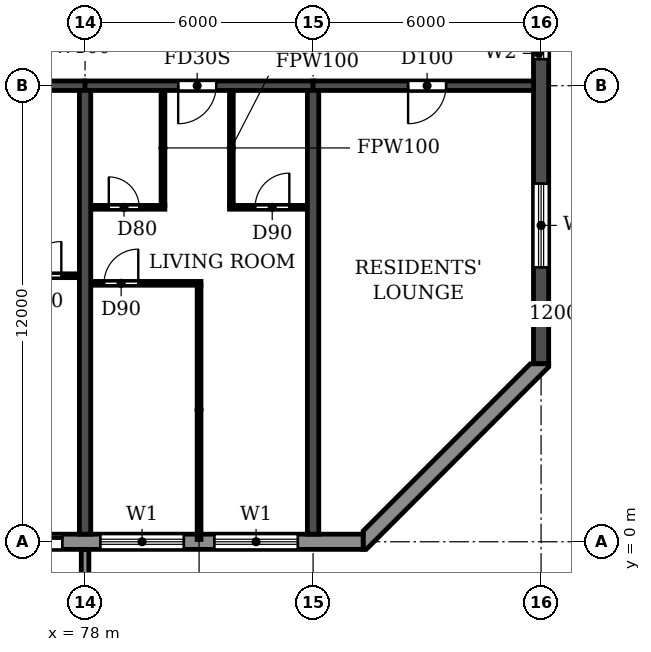
"""IFC4 building model, lengths in metres.
Left out: names, types, materials, properties, quantities, classifications, styles, units other than length and angle.
Written with IfcOpenShell. Run it as: python <this file> out.ifc"""

import sys

from ifc_helpers import new_model, si_unit, direction, frame, frame_2d, origin, place, context, subcontext, project, spatial, polyline, rectangle, outline, extrude, source, transform, mapped, element, fill, save


model = new_model("IFC4")
c1 = context("Model", 3, precision=1e-05, world=origin(), true_north=direction((0.0, 1.0)))
c2 = subcontext(c1, "Body", "Model", "MODEL_VIEW")
j1 = project(units=[si_unit("LENGTHUNIT", "METRE"), si_unit("PLANEANGLEUNIT", "RADIAN")], contexts=[c1])
p1 = place(None, origin())
s1 = spatial("IfcSite", under=j1, at=p1, CompositionType="ELEMENT")
p2 = place(p1, origin())
s2 = spatial("IfcBuilding", under=s1, at=p2, CompositionType="ELEMENT")
p3 = place(p2, frame((0.0, 0.0, 132.3)))
s3 = spatial("IfcBuildingStorey", under=s2, at=p3, CompositionType="ELEMENT", Elevation=132.3)
for number, where, z_axis, x_axis in (
    (1, (78.0, 0.2, 0.0), (0.0, 0.0, 1.0), (0.0, 1.0, 0.0)),
    (2, (84.0, 0.2, 0.0), (0.0, 0.0, 1.0), (0.0, 1.0, 0.0)),
):
    element("IfcWall", number, at=place(p3, frame(where, z_axis=z_axis, x_axis=x_axis)), inside=s3, PredefinedType="SHEAR", context=c2, shape_type="SweptSolid", body=[
        extrude(rectangle(XDim=11.675, YDim=0.3, at=frame_2d((5.837, 0.0))), origin(), (0.0, 0.0, 1.0), 3.07),
    ])
p4 = place(p3, frame((90.0, 4.683, 0.0), z_axis=(0.0, 0.0, 1.0), x_axis=(0.0, 1.0, 0.0)))
e3 = element("IfcWall", 3, at=p4, inside=s3, PredefinedType="SHEAR", context=c2, shape_type="SweptSolid", body=[
    extrude(rectangle(XDim=33.034, YDim=0.4, at=frame_2d((16.517, 0.0))), origin(), (0.0, 0.0, 1.0), 3.07),
])
p5 = place(p4, frame((23.817, 0.0, 0.9)))
e4 = element("IfcOpeningElement", 4, at=p5, cuts=e3, PredefinedType="OPENING", context=c2, shape_type="SweptSolid", body=[
    extrude(rectangle(XDim=1.2, YDim=1.5, at=frame_2d((0.6, 0.75))), frame((0.0, 0.21, 0.0), z_axis=(0.0, -1.0, 0.0), x_axis=(1.0, 0.0, 0.0)), (0.0, 0.0, 1.0), 0.42),
])
p6 = place(p4, frame((8.017, 0.0, 0.9)))
e5 = element("IfcOpeningElement", 5, at=p6, cuts=e3, PredefinedType="OPENING", context=c2, shape_type="SweptSolid", body=[
    extrude(rectangle(XDim=1.2, YDim=1.5, at=frame_2d((0.6, 0.75))), frame((0.0, 0.21, 0.0), z_axis=(0.0, -1.0, 0.0), x_axis=(1.0, 0.0, 0.0)), (0.0, 0.0, 1.0), 0.42),
])
p7 = place(p4, frame((28.293, 0.0, 0.6)))
e6 = element("IfcOpeningElement", 6, at=p7, cuts=e3, PredefinedType="OPENING", context=c2, shape_type="SweptSolid", body=[
    extrude(rectangle(XDim=2.2, YDim=1.8, at=frame_2d((1.1, 0.9))), frame((0.0, 0.21, 0.0), z_axis=(0.0, -1.0, 0.0), x_axis=(1.0, 0.0, 0.0)), (0.0, 0.0, 1.0), 0.42),
])
p8 = place(p4, frame((2.541, 0.0, 0.6)))
e7 = element("IfcOpeningElement", 7, at=p8, cuts=e3, PredefinedType="OPENING", context=c2, shape_type="SweptSolid", body=[
    extrude(rectangle(XDim=2.2, YDim=1.8, at=frame_2d((1.1, 0.9))), frame((0.0, 0.21, 0.0), z_axis=(0.0, -1.0, 0.0), x_axis=(1.0, 0.0, 0.0)), (0.0, 0.0, 1.0), 0.42),
])
p9 = place(p3, frame((72.0, 12.0, 0.0), z_axis=(0.0, 0.0, 1.0), x_axis=(1.0, 0.0, 0.0)))
e8 = element("IfcWall", 8, at=p9, inside=s3, PredefinedType="SHEAR", context=c2, shape_type="SweptSolid", body=[
    extrude(rectangle(XDim=6.0, YDim=0.25, at=frame_2d((3.0, 0.0))), origin(), (0.0, 0.0, 1.0), 2.47),
])
p10 = place(p9, frame((2.45, 0.0, 0.0)))
e9 = element("IfcOpeningElement", 9, at=p10, cuts=e8, PredefinedType="OPENING", context=c2, shape_type="SweptSolid", body=[
    extrude(rectangle(XDim=1.0, YDim=2.1, at=frame_2d((0.5, 1.05))), frame((0.0, 0.135, 0.0), z_axis=(0.0, -1.0, 0.0), x_axis=(1.0, 0.0, 0.0)), (0.0, 0.0, 1.0), 0.27),
])
p11 = place(p3, frame((78.0, 12.0, 0.0), z_axis=(0.0, 0.0, 1.0), x_axis=(1.0, 0.0, 0.0)))
e10 = element("IfcWall", 10, at=p11, inside=s3, PredefinedType="SHEAR", context=c2, shape_type="SweptSolid", body=[
    extrude(rectangle(XDim=6.0, YDim=0.25, at=frame_2d((3.0, 0.0))), origin(), (0.0, 0.0, 1.0), 2.47),
])
p12 = place(p11, frame((2.45, 0.0, 0.0)))
e11 = element("IfcOpeningElement", 11, at=p12, cuts=e10, PredefinedType="OPENING", context=c2, shape_type="SweptSolid", body=[
    extrude(rectangle(XDim=1.0, YDim=2.1, at=frame_2d((0.5, 1.05))), frame((0.0, 0.135, 0.0), z_axis=(0.0, -1.0, 0.0), x_axis=(1.0, 0.0, 0.0)), (0.0, 0.0, 1.0), 0.27),
])
p13 = place(p3, frame((84.0, 12.0, 0.0), z_axis=(0.0, 0.0, 1.0), x_axis=(1.0, 0.0, 0.0)))
e12 = element("IfcWall", 12, at=p13, inside=s3, PredefinedType="SHEAR", context=c2, shape_type="SweptSolid", body=[
    extrude(rectangle(XDim=5.8, YDim=0.25, at=frame_2d((2.9, 0.0))), origin(), (0.0, 0.0, 1.0), 2.47),
])
p14 = place(p13, frame((2.5, 0.0, 0.0)))
e13 = element("IfcOpeningElement", 13, at=p14, cuts=e12, PredefinedType="OPENING", context=c2, shape_type="SweptSolid", body=[
    extrude(rectangle(XDim=1.0, YDim=2.1, at=frame_2d((0.5, 1.05))), frame((0.0, 0.135, 0.0), z_axis=(0.0, -1.0, 0.0), x_axis=(1.0, 0.0, 0.0)), (0.0, 0.0, 1.0), 0.27),
])
p15 = place(p3, frame((16.683, 0.0, 0.0), z_axis=(0.0, 0.0, 1.0), x_axis=(1.0, 0.0, 0.0)))
e14 = element("IfcWall", 14, at=p15, inside=s3, PredefinedType="STANDARD", context=c2, shape_type="SweptSolid", body=[
    extrude(rectangle(XDim=68.634, YDim=0.4, at=frame_2d((34.317, 0.0))), origin(), (0.0, 0.0, 1.0), 3.07),
])
p16 = place(p15, frame((1.717, 0.0, 0.9)))
e15 = element("IfcOpeningElement", 15, at=p16, cuts=e14, PredefinedType="OPENING", context=c2, shape_type="SweptSolid", body=[
    extrude(rectangle(XDim=2.2, YDim=1.5, at=frame_2d((1.1, 0.75))), frame((0.0, 0.21, 0.0), z_axis=(0.0, -1.0, 0.0), x_axis=(1.0, 0.0, 0.0)), (0.0, 0.0, 1.0), 0.42),
])
p17 = place(p15, frame((4.717, 0.0, 0.9)))
e16 = element("IfcOpeningElement", 16, at=p17, cuts=e14, PredefinedType="OPENING", context=c2, shape_type="SweptSolid", body=[
    extrude(rectangle(XDim=2.2, YDim=1.5, at=frame_2d((1.1, 0.75))), frame((0.0, 0.21, 0.0), z_axis=(0.0, -1.0, 0.0), x_axis=(1.0, 0.0, 0.0)), (0.0, 0.0, 1.0), 0.42),
])
p18 = place(p15, frame((7.717, 0.0, 0.9)))
e17 = element("IfcOpeningElement", 17, at=p18, cuts=e14, PredefinedType="OPENING", context=c2, shape_type="SweptSolid", body=[
    extrude(rectangle(XDim=2.2, YDim=1.5, at=frame_2d((1.1, 0.75))), frame((0.0, 0.21, 0.0), z_axis=(0.0, -1.0, 0.0), x_axis=(1.0, 0.0, 0.0)), (0.0, 0.0, 1.0), 0.42),
])
p19 = place(p15, frame((10.917, 0.0, 0.0)))
e18 = element("IfcOpeningElement", 18, at=p19, cuts=e14, PredefinedType="OPENING", context=c2, shape_type="SweptSolid", body=[
    extrude(rectangle(XDim=1.8, YDim=2.4, at=frame_2d((0.9, 1.2))), frame((0.0, 0.21, 0.0), z_axis=(0.0, -1.0, 0.0), x_axis=(1.0, 0.0, 0.0)), (0.0, 0.0, 1.0), 0.42),
])
p20 = place(p15, frame((13.717, 0.0, 0.9)))
e19 = element("IfcOpeningElement", 19, at=p20, cuts=e14, PredefinedType="OPENING", context=c2, shape_type="SweptSolid", body=[
    extrude(rectangle(XDim=2.2, YDim=1.5, at=frame_2d((1.1, 0.75))), frame((0.0, 0.21, 0.0), z_axis=(0.0, -1.0, 0.0), x_axis=(1.0, 0.0, 0.0)), (0.0, 0.0, 1.0), 0.42),
])
p21 = place(p15, frame((16.717, 0.0, 0.9)))
e20 = element("IfcOpeningElement", 20, at=p21, cuts=e14, PredefinedType="OPENING", context=c2, shape_type="SweptSolid", body=[
    extrude(rectangle(XDim=2.2, YDim=1.5, at=frame_2d((1.1, 0.75))), frame((0.0, 0.21, 0.0), z_axis=(0.0, -1.0, 0.0), x_axis=(1.0, 0.0, 0.0)), (0.0, 0.0, 1.0), 0.42),
])
p22 = place(p15, frame((19.917, 0.0, 0.0)))
e21 = element("IfcOpeningElement", 21, at=p22, cuts=e14, PredefinedType="OPENING", context=c2, shape_type="SweptSolid", body=[
    extrude(rectangle(XDim=1.8, YDim=2.4, at=frame_2d((0.9, 1.2))), frame((0.0, 0.21, 0.0), z_axis=(0.0, -1.0, 0.0), x_axis=(1.0, 0.0, 0.0)), (0.0, 0.0, 1.0), 0.42),
])
p23 = place(p15, frame((22.717, 0.0, 0.9)))
e22 = element("IfcOpeningElement", 22, at=p23, cuts=e14, PredefinedType="OPENING", context=c2, shape_type="SweptSolid", body=[
    extrude(rectangle(XDim=2.2, YDim=1.5, at=frame_2d((1.1, 0.75))), frame((0.0, 0.21, 0.0), z_axis=(0.0, -1.0, 0.0), x_axis=(1.0, 0.0, 0.0)), (0.0, 0.0, 1.0), 0.42),
])
p24 = place(p15, frame((25.717, 0.0, 0.9)))
e23 = element("IfcOpeningElement", 23, at=p24, cuts=e14, PredefinedType="OPENING", context=c2, shape_type="SweptSolid", body=[
    extrude(rectangle(XDim=2.2, YDim=1.5, at=frame_2d((1.1, 0.75))), frame((0.0, 0.21, 0.0), z_axis=(0.0, -1.0, 0.0), x_axis=(1.0, 0.0, 0.0)), (0.0, 0.0, 1.0), 0.42),
])
p25 = place(p15, frame((28.717, 0.0, 0.9)))
e24 = element("IfcOpeningElement", 24, at=p25, cuts=e14, PredefinedType="OPENING", context=c2, shape_type="SweptSolid", body=[
    extrude(rectangle(XDim=2.2, YDim=1.5, at=frame_2d((1.1, 0.75))), frame((0.0, 0.21, 0.0), z_axis=(0.0, -1.0, 0.0), x_axis=(1.0, 0.0, 0.0)), (0.0, 0.0, 1.0), 0.42),
])
p26 = place(p15, frame((31.917, 0.0, 0.0)))
e25 = element("IfcOpeningElement", 25, at=p26, cuts=e14, PredefinedType="OPENING", context=c2, shape_type="SweptSolid", body=[
    extrude(rectangle(XDim=1.8, YDim=2.4, at=frame_2d((0.9, 1.2))), frame((0.0, 0.21, 0.0), z_axis=(0.0, -1.0, 0.0), x_axis=(1.0, 0.0, 0.0)), (0.0, 0.0, 1.0), 0.42),
])
p27 = place(p15, frame((34.717, 0.0, 0.9)))
e26 = element("IfcOpeningElement", 26, at=p27, cuts=e14, PredefinedType="OPENING", context=c2, shape_type="SweptSolid", body=[
    extrude(rectangle(XDim=2.2, YDim=1.5, at=frame_2d((1.1, 0.75))), frame((0.0, 0.21, 0.0), z_axis=(0.0, -1.0, 0.0), x_axis=(1.0, 0.0, 0.0)), (0.0, 0.0, 1.0), 0.42),
])
p28 = place(p15, frame((37.717, 0.0, 0.9)))
e27 = element("IfcOpeningElement", 27, at=p28, cuts=e14, PredefinedType="OPENING", context=c2, shape_type="SweptSolid", body=[
    extrude(rectangle(XDim=2.2, YDim=1.5, at=frame_2d((1.1, 0.75))), frame((0.0, 0.21, 0.0), z_axis=(0.0, -1.0, 0.0), x_axis=(1.0, 0.0, 0.0)), (0.0, 0.0, 1.0), 0.42),
])
p29 = place(p15, frame((40.717, 0.0, 0.9)))
e28 = element("IfcOpeningElement", 28, at=p29, cuts=e14, PredefinedType="OPENING", context=c2, shape_type="SweptSolid", body=[
    extrude(rectangle(XDim=2.2, YDim=1.5, at=frame_2d((1.1, 0.75))), frame((0.0, 0.21, 0.0), z_axis=(0.0, -1.0, 0.0), x_axis=(1.0, 0.0, 0.0)), (0.0, 0.0, 1.0), 0.42),
])
p30 = place(p15, frame((43.717, 0.0, 0.9)))
e29 = element("IfcOpeningElement", 29, at=p30, cuts=e14, PredefinedType="OPENING", context=c2, shape_type="SweptSolid", body=[
    extrude(rectangle(XDim=2.2, YDim=1.5, at=frame_2d((1.1, 0.75))), frame((0.0, 0.21, 0.0), z_axis=(0.0, -1.0, 0.0), x_axis=(1.0, 0.0, 0.0)), (0.0, 0.0, 1.0), 0.42),
])
p31 = place(p15, frame((46.917, 0.0, 0.0)))
e30 = element("IfcOpeningElement", 30, at=p31, cuts=e14, PredefinedType="OPENING", context=c2, shape_type="SweptSolid", body=[
    extrude(rectangle(XDim=1.8, YDim=2.4, at=frame_2d((0.9, 1.2))), frame((0.0, 0.21, 0.0), z_axis=(0.0, -1.0, 0.0), x_axis=(1.0, 0.0, 0.0)), (0.0, 0.0, 1.0), 0.42),
])
p32 = place(p15, frame((49.717, 0.0, 0.9)))
e31 = element("IfcOpeningElement", 31, at=p32, cuts=e14, PredefinedType="OPENING", context=c2, shape_type="SweptSolid", body=[
    extrude(rectangle(XDim=2.2, YDim=1.5, at=frame_2d((1.1, 0.75))), frame((0.0, 0.21, 0.0), z_axis=(0.0, -1.0, 0.0), x_axis=(1.0, 0.0, 0.0)), (0.0, 0.0, 1.0), 0.42),
])
p33 = place(p15, frame((52.717, 0.0, 0.9)))
e32 = element("IfcOpeningElement", 32, at=p33, cuts=e14, PredefinedType="OPENING", context=c2, shape_type="SweptSolid", body=[
    extrude(rectangle(XDim=2.2, YDim=1.5, at=frame_2d((1.1, 0.75))), frame((0.0, 0.21, 0.0), z_axis=(0.0, -1.0, 0.0), x_axis=(1.0, 0.0, 0.0)), (0.0, 0.0, 1.0), 0.42),
])
p34 = place(p15, frame((55.717, 0.0, 0.9)))
e33 = element("IfcOpeningElement", 33, at=p34, cuts=e14, PredefinedType="OPENING", context=c2, shape_type="SweptSolid", body=[
    extrude(rectangle(XDim=2.2, YDim=1.5, at=frame_2d((1.1, 0.75))), frame((0.0, 0.21, 0.0), z_axis=(0.0, -1.0, 0.0), x_axis=(1.0, 0.0, 0.0)), (0.0, 0.0, 1.0), 0.42),
])
p35 = place(p15, frame((58.917, 0.0, 0.0)))
e34 = element("IfcOpeningElement", 34, at=p35, cuts=e14, PredefinedType="OPENING", context=c2, shape_type="SweptSolid", body=[
    extrude(rectangle(XDim=1.8, YDim=2.4, at=frame_2d((0.9, 1.2))), frame((0.0, 0.21, 0.0), z_axis=(0.0, -1.0, 0.0), x_axis=(1.0, 0.0, 0.0)), (0.0, 0.0, 1.0), 0.42),
])
p36 = place(p15, frame((61.717, 0.0, 0.9)))
e35 = element("IfcOpeningElement", 35, at=p36, cuts=e14, PredefinedType="OPENING", context=c2, shape_type="SweptSolid", body=[
    extrude(rectangle(XDim=2.2, YDim=1.5, at=frame_2d((1.1, 0.75))), frame((0.0, 0.21, 0.0), z_axis=(0.0, -1.0, 0.0), x_axis=(1.0, 0.0, 0.0)), (0.0, 0.0, 1.0), 0.42),
])
p37 = place(p15, frame((64.717, 0.0, 0.9)))
e36 = element("IfcOpeningElement", 36, at=p37, cuts=e14, PredefinedType="OPENING", context=c2, shape_type="SweptSolid", body=[
    extrude(rectangle(XDim=2.2, YDim=1.5, at=frame_2d((1.1, 0.75))), frame((0.0, 0.21, 0.0), z_axis=(0.0, -1.0, 0.0), x_axis=(1.0, 0.0, 0.0)), (0.0, 0.0, 1.0), 0.42),
])
p38 = place(p3, origin())
e37 = element("IfcWall", 37, at=p38, inside=s3, PredefinedType="STANDARD", context=c2, shape_type="SweptSolid", body=[
    extrude(outline(polyline([(85.317, -0.2), (85.4, -0.2), (90.2, 4.6), (90.2, 4.683), (89.717, 4.683), (85.317, 0.283), (85.317, -0.2)])), origin(), (0.0, 0.0, 1.0), 3.07),
])
m1 = source(origin(), c2, "Body", "SweptSolid", [
    extrude(outline(polyline([(0.0, 0.0), (0.2, 0.0), (0.2, 1.65), (0.0, 1.65), (0.0, 0.0)])), origin(), (0.0, 0.0, 1.0), 3.1),
])
p39 = place(p3, frame((77.9, -1.85, 0.0)))
e38 = element("IfcWall", 38, at=p39, inside=s3, PredefinedType="STANDARD", context=c2, shape_type="MappedRepresentation", body=[
    mapped(m1, transform((0.0, 0.0, 0.0))),
])
p40 = place(p3, frame((78.16, 6.8, 0.0), z_axis=(0.0, 0.0, 1.0), x_axis=(1.0, 0.0, 0.0)))
e39 = element("IfcWall", 39, at=p40, inside=s3, PredefinedType="PARTITIONING", context=c2, shape_type="SweptSolid", body=[
    extrude(rectangle(XDim=2.89, YDim=0.1, at=frame_2d((1.445, 0.0))), origin(), (0.0, 0.0, 1.0), 3.07),
])
p41 = place(p40, frame((0.34, 0.0, 0.0)))
e40 = element("IfcOpeningElement", 40, at=p41, cuts=e39, PredefinedType="OPENING", context=c2, shape_type="SweptSolid", body=[
    extrude(rectangle(XDim=0.9, YDim=2.1, at=frame_2d((0.45, 1.05))), frame((0.0, 0.06, 0.0), z_axis=(0.0, -1.0, 0.0), x_axis=(1.0, 0.0, 0.0)), (0.0, 0.0, 1.0), 0.12),
])
p42 = place(p3, frame((75.8, 7.0, 0.0), z_axis=(0.0, 0.0, 1.0), x_axis=(1.0, 0.0, 0.0)))
e41 = element("IfcWall", 41, at=p42, inside=s3, PredefinedType="PARTITIONING", context=c2, shape_type="SweptSolid", body=[
    extrude(rectangle(XDim=2.04, YDim=0.1, at=frame_2d((1.02, 0.0))), origin(), (0.0, 0.0, 1.0), 3.07),
])
p43 = place(p42, frame((0.675, 0.0, 0.0)))
e42 = element("IfcOpeningElement", 42, at=p43, cuts=e41, PredefinedType="OPENING", context=c2, shape_type="SweptSolid", body=[
    extrude(rectangle(XDim=0.9, YDim=2.1, at=frame_2d((0.45, 1.05))), frame((0.0, 0.06, 0.0), z_axis=(0.0, -1.0, 0.0), x_axis=(1.0, 0.0, 0.0)), (0.0, 0.0, 1.0), 0.12),
])
p44 = place(p3, frame((78.16, 8.8, 0.0), z_axis=(0.0, 0.0, 1.0), x_axis=(1.0, 0.0, 0.0)))
e43 = element("IfcWall", 43, at=p44, inside=s3, PredefinedType="PARTITIONING", context=c2, shape_type="SweptSolid", body=[
    extrude(rectangle(XDim=1.94, YDim=0.1, at=frame_2d((0.97, 0.0))), origin(), (0.0, 0.0, 1.0), 3.07),
])
p45 = place(p44, frame((0.465, 0.0, 0.0)))
e44 = element("IfcOpeningElement", 44, at=p45, cuts=e43, PredefinedType="OPENING", context=c2, shape_type="SweptSolid", body=[
    extrude(rectangle(XDim=0.8, YDim=2.1, at=frame_2d((0.4, 1.05))), frame((0.0, 0.06, 0.0), z_axis=(0.0, -1.0, 0.0), x_axis=(1.0, 0.0, 0.0)), (0.0, 0.0, 1.0), 0.12),
])
p46 = place(p3, frame((81.8, 8.8, 0.0), z_axis=(0.0, 0.0, 1.0), x_axis=(1.0, 0.0, 0.0)))
e45 = element("IfcWall", 45, at=p46, inside=s3, PredefinedType="PARTITIONING", context=c2, shape_type="SweptSolid", body=[
    extrude(rectangle(XDim=2.04, YDim=0.1, at=frame_2d((1.02, 0.0))), origin(), (0.0, 0.0, 1.0), 3.07),
])
p47 = place(p46, frame((0.675, 0.0, 0.0)))
e46 = element("IfcOpeningElement", 46, at=p47, cuts=e45, PredefinedType="OPENING", context=c2, shape_type="SweptSolid", body=[
    extrude(rectangle(XDim=0.9, YDim=2.1, at=frame_2d((0.45, 1.05))), frame((0.0, 0.06, 0.0), z_axis=(0.0, -1.0, 0.0), x_axis=(1.0, 0.0, 0.0)), (0.0, 0.0, 1.0), 0.12),
])
p48 = place(p3, frame((80.05, 8.85, 0.0), z_axis=(0.0, 0.0, 1.0), x_axis=(0.0, 1.0, 0.0)))
e47 = element("IfcWall", 47, at=p48, inside=s3, PredefinedType="PARTITIONING", context=c2, shape_type="SweptSolid", body=[
    extrude(rectangle(XDim=3.015, YDim=0.1, at=frame_2d((1.507, 0.0))), origin(), (0.0, 0.0, 1.0), 3.07),
])
p49 = place(p3, frame((81.0, 0.06, 0.0), z_axis=(0.0, 0.0, 1.0), x_axis=(0.0, 1.0, 0.0)))
e48 = element("IfcWall", 48, at=p49, inside=s3, PredefinedType="PARTITIONING", context=c2, shape_type="SweptSolid", body=[
    extrude(rectangle(XDim=6.69, YDim=0.1, at=frame_2d((3.345, 0.0))), origin(), (0.0, 0.0, 1.0), 3.07),
])
p50 = place(p3, frame((81.85, 8.85, 0.0), z_axis=(0.0, 0.0, 1.0), x_axis=(0.0, 1.0, 0.0)))
e49 = element("IfcWall", 49, at=p50, inside=s3, PredefinedType="PARTITIONING", context=c2, shape_type="SweptSolid", body=[
    extrude(rectangle(XDim=3.015, YDim=0.1, at=frame_2d((1.507, 0.0))), origin(), (0.0, 0.0, 1.0), 3.07),
])
p51 = place(p35, origin())
e50 = element("IfcDoor", 50, at=p51, inside=s3, OperationType="DOUBLE_DOOR_SLIDING", PredefinedType="DOOR", context=c2, shape_type="SweptSolid", body=[
    extrude(rectangle(XDim=1.8, YDim=2.4, at=frame_2d((0.9, 1.2))), frame((0.0, 0.025, 0.0), z_axis=(0.0, -1.0, 0.0), x_axis=(1.0, 0.0, 0.0)), (0.0, 0.0, 1.0), 0.05),
])
fill(e34, e50)
p52 = place(p36, origin())
e51 = element("IfcWindow", 51, at=p52, inside=s3, PartitioningType="DOUBLE_PANEL_HORIZONTAL", PredefinedType="WINDOW", context=c2, shape_type="SweptSolid", body=[
    extrude(rectangle(XDim=2.2, YDim=1.5, at=frame_2d((1.1, 0.75))), frame((0.0, 0.03, 0.0), z_axis=(0.0, -1.0, 0.0), x_axis=(1.0, 0.0, 0.0)), (0.0, 0.0, 1.0), 0.06),
])
fill(e35, e51)
p53 = place(p37, origin())
e52 = element("IfcWindow", 52, at=p53, inside=s3, PartitioningType="DOUBLE_PANEL_HORIZONTAL", PredefinedType="WINDOW", context=c2, shape_type="SweptSolid", body=[
    extrude(rectangle(XDim=2.2, YDim=1.5, at=frame_2d((1.1, 0.75))), frame((0.0, 0.03, 0.0), z_axis=(0.0, -1.0, 0.0), x_axis=(1.0, 0.0, 0.0)), (0.0, 0.0, 1.0), 0.06),
])
fill(e36, e52)
p54 = place(p6, origin())
e53 = element("IfcWindow", 53, at=p54, inside=s3, PartitioningType="SINGLE_PANEL", PredefinedType="WINDOW", context=c2, shape_type="SweptSolid", body=[
    extrude(rectangle(XDim=1.2, YDim=1.5, at=frame_2d((0.6, 0.75))), frame((0.0, 0.03, 0.0), z_axis=(0.0, -1.0, 0.0), x_axis=(1.0, 0.0, 0.0)), (0.0, 0.0, 1.0), 0.06),
])
fill(e5, e53)
p55 = place(p8, origin())
e54 = element("IfcWindow", 54, at=p55, inside=s3, PartitioningType="DOUBLE_PANEL_HORIZONTAL", PredefinedType="WINDOW", context=c2, shape_type="SweptSolid", body=[
    extrude(rectangle(XDim=2.2, YDim=1.8, at=frame_2d((1.1, 0.9))), frame((0.0, 0.03, 0.0), z_axis=(0.0, -1.0, 0.0), x_axis=(1.0, 0.0, 0.0)), (0.0, 0.0, 1.0), 0.06),
])
fill(e7, e54)
p56 = place(p43, origin())
e55 = element("IfcDoor", 55, at=p56, inside=s3, OperationType="SINGLE_SWING_RIGHT", PredefinedType="DOOR", context=c2, shape_type="SweptSolid", body=[
    extrude(rectangle(XDim=0.9, YDim=2.1, at=frame_2d((0.45, 1.05))), frame((0.0, 0.025, 0.0), z_axis=(0.0, -1.0, 0.0), x_axis=(1.0, 0.0, 0.0)), (0.0, 0.0, 1.0), 0.05),
])
fill(e42, e55)
p57 = place(p41, origin())
e56 = element("IfcDoor", 56, at=p57, inside=s3, OperationType="SINGLE_SWING_RIGHT", PredefinedType="DOOR", context=c2, shape_type="SweptSolid", body=[
    extrude(rectangle(XDim=0.9, YDim=2.1, at=frame_2d((0.45, 1.05))), frame((0.0, 0.025, 0.0), z_axis=(0.0, -1.0, 0.0), x_axis=(1.0, 0.0, 0.0)), (0.0, 0.0, 1.0), 0.05),
])
fill(e40, e56)
p58 = place(p45, origin())
e57 = element("IfcDoor", 57, at=p58, inside=s3, OperationType="SINGLE_SWING_LEFT", PredefinedType="DOOR", context=c2, shape_type="SweptSolid", body=[
    extrude(rectangle(XDim=0.8, YDim=2.1, at=frame_2d((0.4, 1.05))), frame((0.0, 0.025, 0.0), z_axis=(0.0, -1.0, 0.0), x_axis=(1.0, 0.0, 0.0)), (0.0, 0.0, 1.0), 0.05),
])
fill(e44, e57)
p59 = place(p12, frame((1.0, 0.0, 0.0), z_axis=(0.0, 0.0, 1.0), x_axis=(-1.0, 0.0, 0.0)))
e58 = element("IfcDoor", 58, at=p59, inside=s3, OperationType="SINGLE_SWING_RIGHT", PredefinedType="DOOR", context=c2, shape_type="SweptSolid", body=[
    extrude(rectangle(XDim=1.0, YDim=2.1, at=frame_2d((0.5, 1.05))), frame((0.0, 0.025, 0.0), z_axis=(0.0, -1.0, 0.0), x_axis=(1.0, 0.0, 0.0)), (0.0, 0.0, 1.0), 0.05),
])
fill(e11, e58)
p60 = place(p47, origin())
e59 = element("IfcDoor", 59, at=p60, inside=s3, OperationType="SINGLE_SWING_RIGHT", PredefinedType="DOOR", context=c2, shape_type="SweptSolid", body=[
    extrude(rectangle(XDim=0.9, YDim=2.1, at=frame_2d((0.45, 1.05))), frame((0.0, 0.025, 0.0), z_axis=(0.0, -1.0, 0.0), x_axis=(1.0, 0.0, 0.0)), (0.0, 0.0, 1.0), 0.05),
])
fill(e46, e59)
p61 = place(p14, frame((1.0, 0.0, 0.0), z_axis=(0.0, 0.0, 1.0), x_axis=(-1.0, 0.0, 0.0)))
e60 = element("IfcDoor", 60, at=p61, inside=s3, OperationType="SINGLE_SWING_RIGHT", PredefinedType="DOOR", context=c2, shape_type="SweptSolid", body=[
    extrude(rectangle(XDim=1.0, YDim=2.1, at=frame_2d((0.5, 1.05))), frame((0.0, 0.025, 0.0), z_axis=(0.0, -1.0, 0.0), x_axis=(1.0, 0.0, 0.0)), (0.0, 0.0, 1.0), 0.05),
])
fill(e13, e60)
save(model, sys.argv[1])
